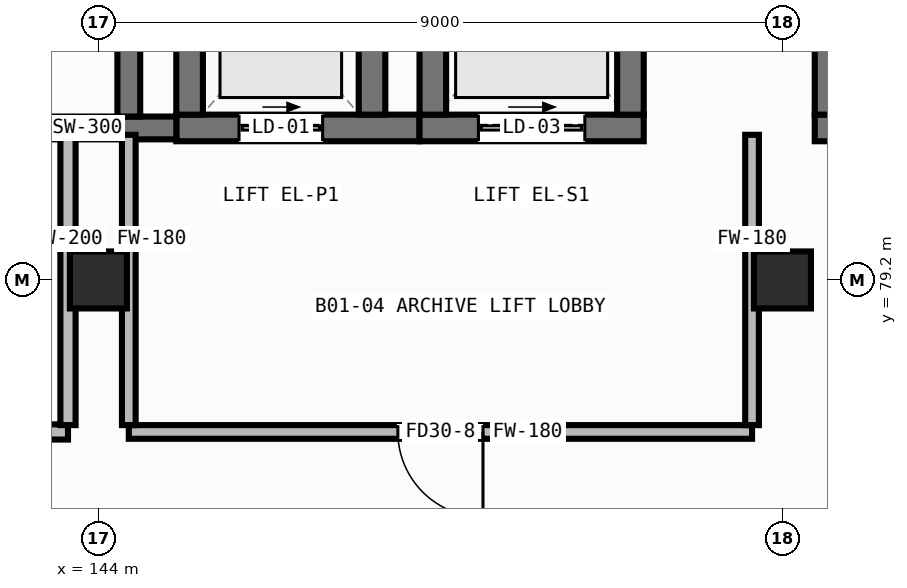
"""IFC4 building model, lengths in metres.
Left out: names, types, materials, properties, quantities, classifications, styles, units other than length and angle.
Written with IfcOpenShell. Run it as: python <this file> out.ifc"""

import sys

from ifc_helpers import new_model, si_unit, direction, frame, frame_2d, origin, origin_2d, place, context, subcontext, project, spatial, rectangle, hollow_rectangle, extrude, element, fill, save


model = new_model("IFC4")
c1 = context("Model", 3, precision=1e-05, world=origin(), true_north=direction((0.0, 1.0)))
c2 = subcontext(c1, "Body", "Model", "MODEL_VIEW")
j1 = project(units=[si_unit("LENGTHUNIT", "METRE"), si_unit("PLANEANGLEUNIT", "RADIAN")], contexts=[c1])
p1 = place(None, origin())
s1 = spatial("IfcSite", under=j1, at=p1, CompositionType="ELEMENT")
p2 = place(p1, origin())
s2 = spatial("IfcBuilding", under=s1, at=p2, CompositionType="ELEMENT")
p3 = place(p2, frame((0.0, 0.0, -4.9)))
s3 = spatial("IfcBuildingStorey", under=s2, at=p3, CompositionType="ELEMENT", Elevation=-4.9)
for number, where, z_axis, x_axis in (
    (1, (144.0, 79.2, 0.0), (0.0, 0.0, 1.0), (1.0, 0.0, 0.0)),
    (2, (153.0, 79.2, 0.0), (0.0, 0.0, 1.0), (1.0, 0.0, 0.0)),
):
    element("IfcColumn", number, at=place(p3, frame(where, z_axis=z_axis, x_axis=x_axis)), inside=s3, PredefinedType="COLUMN", context=c2, shape_type="SweptSolid", body=[
        extrude(hollow_rectangle(XDim=0.75, YDim=0.75, WallThickness=0.032, at=origin_2d()), origin(), (0.0, 0.0, 1.0), 4.9),
    ])
p4 = place(p3, frame((153.425, 81.2, 0.0), z_axis=(0.0, 0.0, 1.0), x_axis=(1.0, 0.0, 0.0)))
e3 = element("IfcWall", 3, at=p4, inside=s3, PredefinedType="SHEAR", context=c2, shape_type="SweptSolid", body=[
    extrude(rectangle(XDim=8.15, YDim=0.35, at=frame_2d((4.075, 0.0))), origin(), (0.0, 0.0, 1.0), 4.625),
])
p5 = place(p4, frame((0.525, 0.0, 0.0)))
e4 = element("IfcOpeningElement", 4, at=p5, cuts=e3, PredefinedType="OPENING", context=c2, shape_type="SweptSolid", body=[
    extrude(rectangle(XDim=1.15, YDim=2.1, at=frame_2d((0.575, 1.05))), frame((0.0, 0.187, 0.0), z_axis=(0.0, -1.0, 0.0), x_axis=(1.0, 0.0, 0.0)), (0.0, 0.0, 1.0), 0.374),
])
p6 = place(p3, frame((153.6, 81.375, 0.0), z_axis=(0.0, 0.0, 1.0), x_axis=(0.0, 1.0, 0.0)))
e5 = element("IfcWall", 5, at=p6, inside=s3, PredefinedType="SHEAR", context=c2, shape_type="SweptSolid", body=[
    extrude(rectangle(XDim=3.55, YDim=0.35, at=frame_2d((1.775, 0.0))), origin(), (0.0, 0.0, 1.0), 4.625),
])
p7 = place(p3, frame((145.025, 81.2, 0.0), z_axis=(0.0, 0.0, 1.0), x_axis=(1.0, 0.0, 0.0)))
e6 = element("IfcWall", 6, at=p7, inside=s3, PredefinedType="SHEAR", context=c2, shape_type="SweptSolid", body=[
    extrude(rectangle(XDim=3.2, YDim=0.35, at=frame_2d((1.6, 0.0))), origin(), (0.0, 0.0, 1.0), 4.625),
])
p8 = place(p7, frame((0.825, 0.0, 0.0)))
e7 = element("IfcOpeningElement", 7, at=p8, cuts=e6, PredefinedType="OPENING", context=c2, shape_type="SweptSolid", body=[
    extrude(rectangle(XDim=1.1, YDim=2.1, at=frame_2d((0.55, 1.05))), frame((0.0, 0.187, 0.0), z_axis=(0.0, -1.0, 0.0), x_axis=(1.0, 0.0, 0.0)), (0.0, 0.0, 1.0), 0.374),
])
for number, where, z_axis, x_axis in (
    (8, (145.2, 81.375, 0.0), (0.0, 0.0, 1.0), (0.0, 1.0, 0.0)),
    (9, (147.6, 81.375, 0.0), (0.0, 0.0, 1.0), (0.0, 1.0, 0.0)),
):
    element("IfcWall", number, at=place(p3, frame(where, z_axis=z_axis, x_axis=x_axis)), inside=s3, PredefinedType="SHEAR", context=c2, shape_type="SweptSolid", body=[
        extrude(rectangle(XDim=2.45, YDim=0.35, at=frame_2d((1.225, 0.0))), origin(), (0.0, 0.0, 1.0), 4.625),
    ])
p9 = place(p3, frame((148.225, 81.2, 0.0), z_axis=(0.0, 0.0, 1.0), x_axis=(1.0, 0.0, 0.0)))
e10 = element("IfcWall", 10, at=p9, inside=s3, PredefinedType="SHEAR", context=c2, shape_type="SweptSolid", body=[
    extrude(rectangle(XDim=2.95, YDim=0.35, at=frame_2d((1.475, 0.0))), origin(), (0.0, 0.0, 1.0), 4.625),
])
p10 = place(p9, frame((0.775, 0.0, 0.0)))
e11 = element("IfcOpeningElement", 11, at=p10, cuts=e10, PredefinedType="OPENING", context=c2, shape_type="SweptSolid", body=[
    extrude(rectangle(XDim=1.4, YDim=2.15, at=frame_2d((0.7, 1.075))), frame((0.0, 0.187, 0.0), z_axis=(0.0, -1.0, 0.0), x_axis=(1.0, 0.0, 0.0)), (0.0, 0.0, 1.0), 0.374),
])
for number, where, z_axis, x_axis in (
    (12, (148.4, 81.375, 0.0), (0.0, 0.0, 1.0), (0.0, 1.0, 0.0)),
    (13, (151.0, 81.375, 0.0), (0.0, 0.0, 1.0), (0.0, 1.0, 0.0)),
):
    element("IfcWall", number, at=place(p3, frame(where, z_axis=z_axis, x_axis=x_axis)), inside=s3, PredefinedType="SHEAR", context=c2, shape_type="SweptSolid", body=[
        extrude(rectangle(XDim=3.05, YDim=0.35, at=frame_2d((1.525, 0.0))), origin(), (0.0, 0.0, 1.0), 4.625),
    ])
p11 = place(p3, frame((141.775, 81.2, 0.0), z_axis=(0.0, 0.0, 1.0), x_axis=(1.0, 0.0, 0.0)))
e14 = element("IfcWall", 14, at=p11, inside=s3, PredefinedType="SHEAR", context=c2, shape_type="SweptSolid", body=[
    extrude(rectangle(XDim=3.25, YDim=0.3, at=frame_2d((1.625, 0.0))), origin(), (0.0, 0.0, 1.0), 4.625),
])
p12 = place(p3, frame((144.4, 81.35, 0.0), z_axis=(0.0, 0.0, 1.0), x_axis=(0.0, 1.0, 0.0)))
e15 = element("IfcWall", 15, at=p12, inside=s3, PredefinedType="SHEAR", context=c2, shape_type="SweptSolid", body=[
    extrude(rectangle(XDim=2.1, YDim=0.3, at=frame_2d((1.05, 0.0))), origin(), (0.0, 0.0, 1.0), 4.625),
])
p13 = place(p3, frame((135.8, 77.2, 0.0), z_axis=(0.0, 0.0, 1.0), x_axis=(1.0, 0.0, 0.0)))
e16 = element("IfcWall", 16, at=p13, inside=s3, PredefinedType="PARTITIONING", context=c2, shape_type="SweptSolid", body=[
    extrude(rectangle(XDim=7.8, YDim=0.2, at=frame_2d((3.9, 0.0))), origin(), (0.0, 0.0, 1.0), 4.625),
])
p14 = place(p13, frame((3.1, 0.0, 0.0)))
e17 = element("IfcOpeningElement", 17, at=p14, cuts=e16, PredefinedType="OPENING", context=c2, shape_type="SweptSolid", body=[
    extrude(rectangle(XDim=1.2, YDim=2.1, at=frame_2d((0.6, 1.05))), frame((0.0, 0.112, 0.0), z_axis=(0.0, -1.0, 0.0), x_axis=(1.0, 0.0, 0.0)), (0.0, 0.0, 1.0), 0.224),
])
p15 = place(p3, frame((143.6, 77.29, 0.0), z_axis=(0.0, 0.0, 1.0), x_axis=(0.0, 1.0, 0.0)))
e18 = element("IfcWall", 18, at=p15, inside=s3, PredefinedType="PARTITIONING", context=c2, shape_type="SweptSolid", body=[
    extrude(rectangle(XDim=3.82, YDim=0.2, at=frame_2d((1.91, 0.0))), origin(), (0.0, 0.0, 1.0), 4.625),
])
p16 = place(p3, frame((144.4, 77.2, 0.0), z_axis=(0.0, 0.0, 1.0), x_axis=(1.0, 0.0, 0.0)))
e19 = element("IfcWall", 19, at=p16, inside=s3, PredefinedType="PARTITIONING", context=c2, shape_type="SweptSolid", body=[
    extrude(rectangle(XDim=8.2, YDim=0.18, at=frame_2d((4.1, 0.0))), origin(), (0.0, 0.0, 1.0), 4.625),
])
p17 = place(p16, frame((3.54, 0.0, 0.0)))
e20 = element("IfcOpeningElement", 20, at=p17, cuts=e19, PredefinedType="OPENING", context=c2, shape_type="SweptSolid", body=[
    extrude(rectangle(XDim=1.12, YDim=2.08, at=frame_2d((0.56, 1.04))), frame((0.0, 0.102, 0.0), z_axis=(0.0, -1.0, 0.0), x_axis=(1.0, 0.0, 0.0)), (0.0, 0.0, 1.0), 0.204),
])
for number, where, z_axis, x_axis in (
    (21, (144.4, 77.29, 0.0), (0.0, 0.0, 1.0), (0.0, 1.0, 0.0)),
    (22, (152.6, 77.29, 0.0), (0.0, 0.0, 1.0), (0.0, 1.0, 0.0)),
):
    element("IfcWall", number, at=place(p3, frame(where, z_axis=z_axis, x_axis=x_axis)), inside=s3, PredefinedType="PARTITIONING", context=c2, shape_type="SweptSolid", body=[
        extrude(rectangle(XDim=3.82, YDim=0.18, at=frame_2d((1.91, 0.0))), origin(), (0.0, 0.0, 1.0), 4.625),
    ])
p18 = place(p8, origin())
e23 = element("IfcDoor", 23, at=p18, inside=s3, OperationType="SLIDING_TO_LEFT", PredefinedType="DOOR", context=c2, shape_type="SweptSolid", body=[
    extrude(rectangle(XDim=1.1, YDim=2.1, at=frame_2d((0.55, 1.05))), frame((0.0, 0.025, 0.0), z_axis=(0.0, -1.0, 0.0), x_axis=(1.0, 0.0, 0.0)), (0.0, 0.0, 1.0), 0.05),
])
fill(e7, e23)
p19 = place(p10, origin())
e24 = element("IfcDoor", 24, at=p19, inside=s3, OperationType="SLIDING_TO_LEFT", PredefinedType="DOOR", context=c2, shape_type="SweptSolid", body=[
    extrude(rectangle(XDim=1.4, YDim=2.15, at=frame_2d((0.7, 1.075))), frame((0.0, 0.025, 0.0), z_axis=(0.0, -1.0, 0.0), x_axis=(1.0, 0.0, 0.0)), (0.0, 0.0, 1.0), 0.05),
])
fill(e11, e24)
p20 = place(p17, frame((1.12, 0.0, 0.0), z_axis=(0.0, 0.0, 1.0), x_axis=(-1.0, 0.0, 0.0)))
e25 = element("IfcDoor", 25, at=p20, inside=s3, OperationType="SINGLE_SWING_LEFT", PredefinedType="DOOR", context=c2, shape_type="SweptSolid", body=[
    extrude(rectangle(XDim=1.12, YDim=2.08, at=frame_2d((0.56, 1.04))), frame((0.0, 0.025, 0.0), z_axis=(0.0, -1.0, 0.0), x_axis=(1.0, 0.0, 0.0)), (0.0, 0.0, 1.0), 0.05),
])
fill(e20, e25)
save(model, sys.argv[1])
